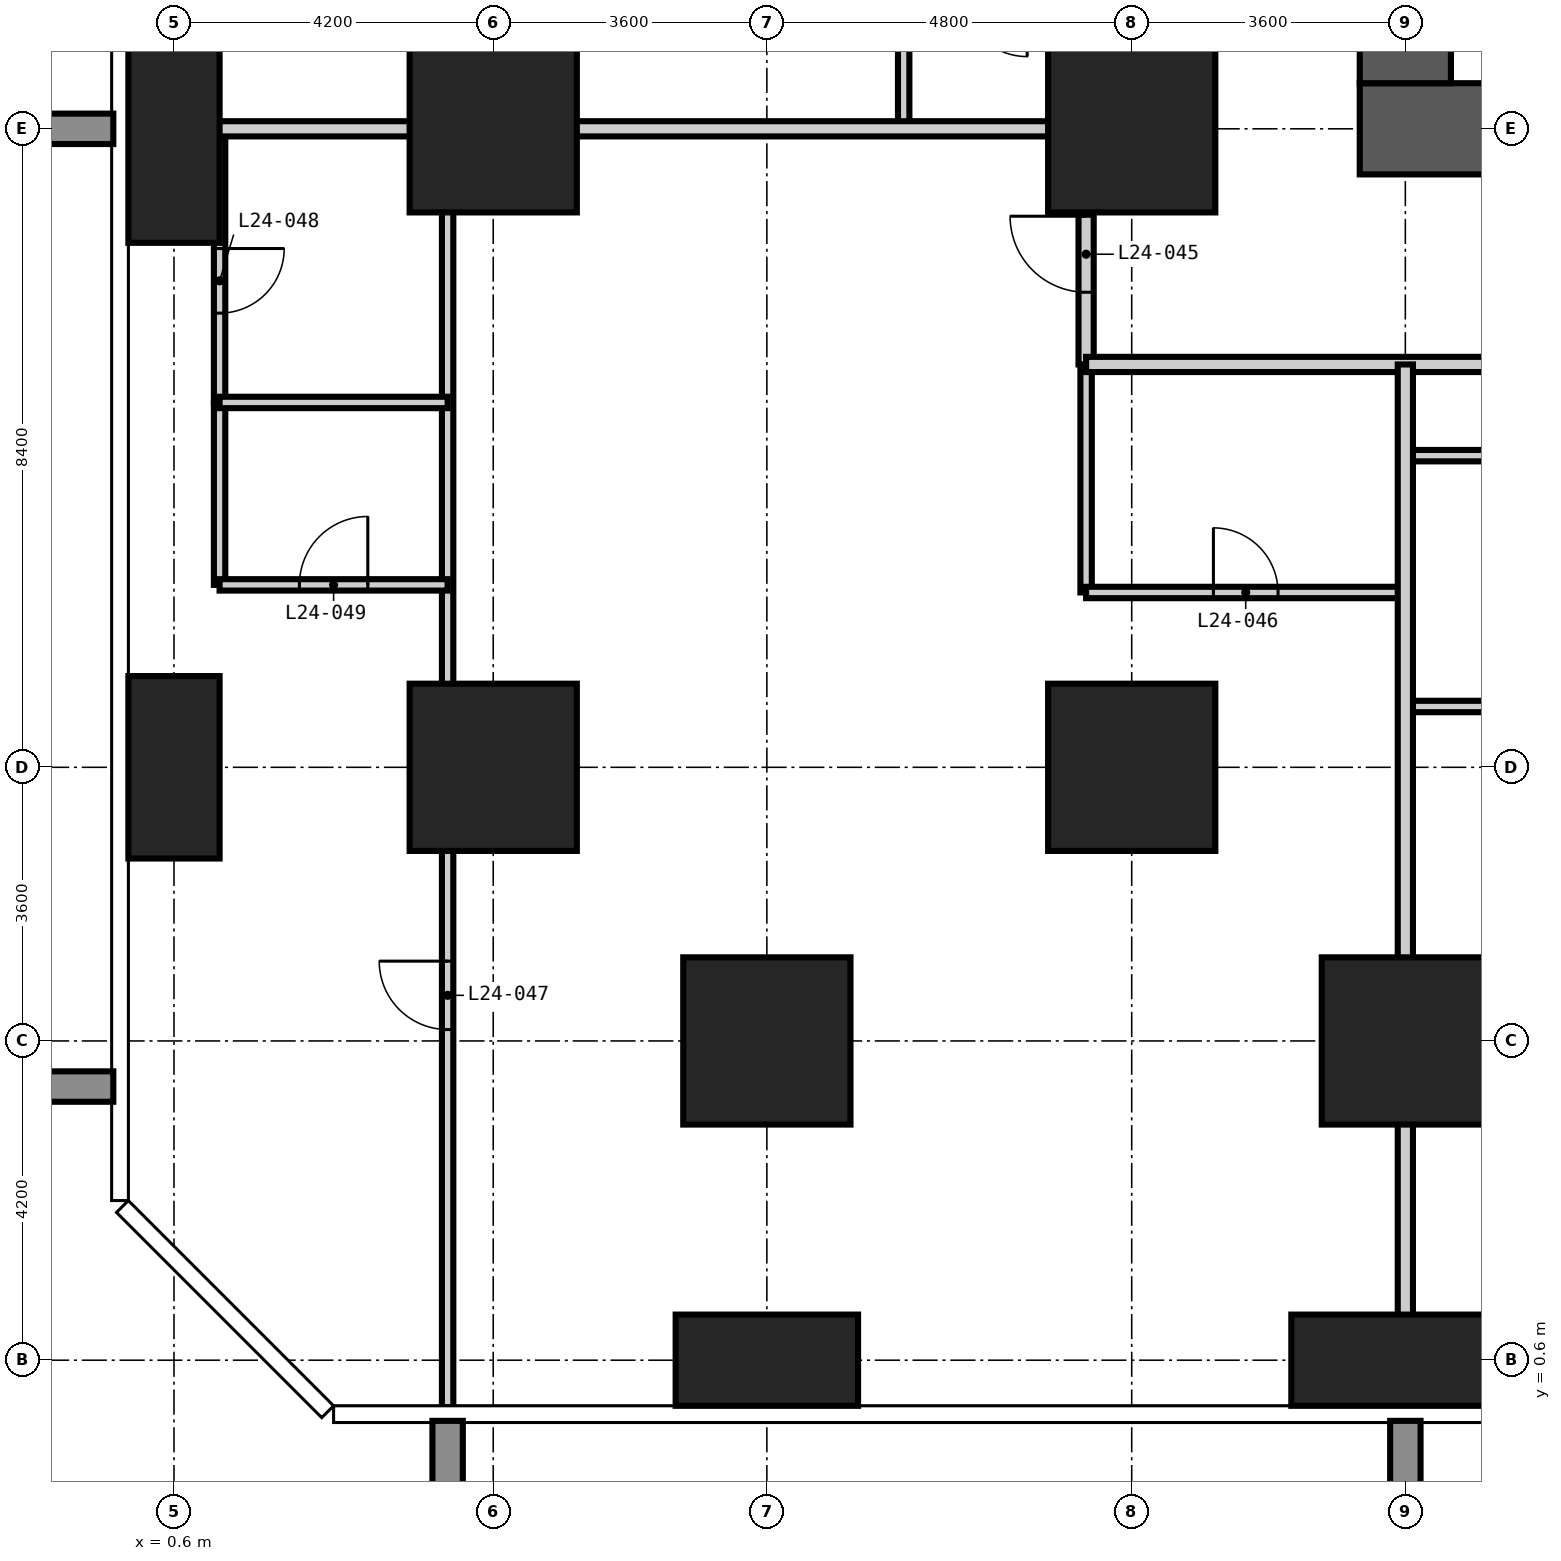
"""IFC4 building model, lengths in metres.
Left out: names, types, materials, properties, quantities, classifications, styles, units other than length and angle.
Written with IfcOpenShell. Run it as: python <this file> out.ifc"""

import sys

from ifc_helpers import new_model, si_unit, direction, frame, frame_2d, origin, origin_2d, place, context, subcontext, project, spatial, rectangle, extrude, element, fill, save


model = new_model("IFC4")
c1 = context("Model", 3, precision=1e-05, world=origin(), true_north=direction((0.0, 1.0)))
c2 = subcontext(c1, "Body", "Model", "MODEL_VIEW")
j1 = project(units=[si_unit("LENGTHUNIT", "METRE"), si_unit("PLANEANGLEUNIT", "RADIAN")], contexts=[c1])
p1 = place(None, origin())
s1 = spatial("IfcSite", under=j1, at=p1, CompositionType="ELEMENT")
p2 = place(p1, origin())
s2 = spatial("IfcBuilding", under=s1, at=p2, CompositionType="ELEMENT")
p3 = place(p2, frame((0.0, 0.0, 97.2)))
s3 = spatial("IfcBuildingStorey", under=s2, at=p3, CompositionType="ELEMENT", Elevation=97.2)
p4 = place(p3, frame((0.6, 8.4, -0.35), z_axis=(0.0, 0.0, 1.0), x_axis=(1.0, 0.0, 0.0)))
e1 = element("IfcColumn", 1, at=p4, inside=s3, PredefinedType="COLUMN", context=c2, shape_type="SweptSolid", body=[
    extrude(rectangle(XDim=1.2, YDim=2.4, at=origin_2d()), origin(), (0.0, 0.0, 1.0), 3.6),
])
p5 = place(p3, frame((0.6, 16.8, -0.35), z_axis=(0.0, 0.0, 1.0), x_axis=(1.0, 0.0, 0.0)))
e2 = element("IfcColumn", 2, at=p5, inside=s3, PredefinedType="COLUMN", context=c2, shape_type="SweptSolid", body=[
    extrude(rectangle(XDim=1.2, YDim=3.0, at=origin_2d()), origin(), (0.0, 0.0, 1.0), 3.6),
])
for number, where, z_axis, x_axis in (
    (3, (4.8, 8.4, -0.35), (0.0, 0.0, 1.0), (1.0, 0.0, 0.0)),
    (4, (4.8, 16.8, -0.35), (0.0, 0.0, 1.0), (1.0, 0.0, 0.0)),
):
    element("IfcColumn", number, at=place(p3, frame(where, z_axis=z_axis, x_axis=x_axis)), inside=s3, PredefinedType="COLUMN", context=c2, shape_type="SweptSolid", body=[
        extrude(rectangle(XDim=2.2, YDim=2.2, at=origin_2d()), origin(), (0.0, 0.0, 1.0), 3.6),
    ])
p6 = place(p3, frame((8.4, 0.6, -0.35), z_axis=(0.0, 0.0, 1.0), x_axis=(1.0, 0.0, 0.0)))
e5 = element("IfcColumn", 5, at=p6, inside=s3, PredefinedType="COLUMN", context=c2, shape_type="SweptSolid", body=[
    extrude(rectangle(XDim=2.4, YDim=1.2, at=origin_2d()), origin(), (0.0, 0.0, 1.0), 3.6),
])
for number, where, z_axis, x_axis in (
    (6, (8.4, 4.8, -0.35), (0.0, 0.0, 1.0), (1.0, 0.0, 0.0)),
    (7, (13.2, 8.4, -0.35), (0.0, 0.0, 1.0), (1.0, 0.0, 0.0)),
    (8, (13.2, 16.8, -0.35), (0.0, 0.0, 1.0), (1.0, 0.0, 0.0)),
):
    element("IfcColumn", number, at=place(p3, frame(where, z_axis=z_axis, x_axis=x_axis)), inside=s3, PredefinedType="COLUMN", context=c2, shape_type="SweptSolid", body=[
        extrude(rectangle(XDim=2.2, YDim=2.2, at=origin_2d()), origin(), (0.0, 0.0, 1.0), 3.6),
    ])
p7 = place(p3, frame((16.8, 0.6, -0.35), z_axis=(0.0, 0.0, 1.0), x_axis=(1.0, 0.0, 0.0)))
e9 = element("IfcColumn", 9, at=p7, inside=s3, PredefinedType="COLUMN", context=c2, shape_type="SweptSolid", body=[
    extrude(rectangle(XDim=3.0, YDim=1.2, at=origin_2d()), origin(), (0.0, 0.0, 1.0), 3.6),
])
p8 = place(p3, frame((16.8, 4.8, -0.35), z_axis=(0.0, 0.0, 1.0), x_axis=(1.0, 0.0, 0.0)))
e10 = element("IfcColumn", 10, at=p8, inside=s3, PredefinedType="COLUMN", context=c2, shape_type="SweptSolid", body=[
    extrude(rectangle(XDim=2.2, YDim=2.2, at=origin_2d()), origin(), (0.0, 0.0, 1.0), 3.6),
])
p9 = place(p3, frame((16.2, 16.8, -0.35), z_axis=(0.0, 0.0, 1.0), x_axis=(1.0, 0.0, 0.0)))
e11 = element("IfcWall", 11, at=p9, inside=s3, PredefinedType="SHEAR", context=c2, shape_type="SweptSolid", body=[
    extrude(rectangle(XDim=26.4, YDim=1.2, at=frame_2d((13.2, 0.0))), origin(), (0.0, 0.0, 1.0), 3.6),
])
p10 = place(p9, frame((12.7, 0.0, 0.35)))
e12 = element("IfcOpeningElement", 12, at=p10, cuts=e11, PredefinedType="OPENING", context=c2, shape_type="SweptSolid", body=[
    extrude(rectangle(XDim=1.0, YDim=2.1, at=frame_2d((0.5, 1.05))), frame((0.0, 0.61, 0.0), z_axis=(0.0, -1.0, 0.0), x_axis=(1.0, 0.0, 0.0)), (0.0, 0.0, 1.0), 1.22),
])
p11 = place(p9, frame((19.0, 0.0, 0.35)))
e13 = element("IfcOpeningElement", 13, at=p11, cuts=e11, PredefinedType="OPENING", context=c2, shape_type="SweptSolid", body=[
    extrude(rectangle(XDim=1.0, YDim=2.1, at=frame_2d((0.5, 1.05))), frame((0.0, 0.61, 0.0), z_axis=(0.0, -1.0, 0.0), x_axis=(1.0, 0.0, 0.0)), (0.0, 0.0, 1.0), 1.22),
])
p12 = place(p3, frame((16.8, 41.4, -0.35), z_axis=(0.0, 0.0, 1.0), x_axis=(0.0, -1.0, 0.0)))
e14 = element("IfcWall", 14, at=p12, inside=s3, PredefinedType="SHEAR", context=c2, shape_type="SweptSolid", body=[
    extrude(rectangle(XDim=24.0, YDim=1.2, at=frame_2d((12.0, 0.0))), origin(), (0.0, 0.0, 1.0), 3.6),
])
p13 = place(p12, frame((11.1, 0.0, 0.35)))
e15 = element("IfcOpeningElement", 15, at=p13, cuts=e14, PredefinedType="OPENING", context=c2, shape_type="SweptSolid", body=[
    extrude(rectangle(XDim=1.8, YDim=2.2, at=frame_2d((0.9, 1.1))), frame((0.0, 0.61, 0.0), z_axis=(0.0, -1.0, 0.0), x_axis=(1.0, 0.0, 0.0)), (0.0, 0.0, 1.0), 1.22),
])
p14 = place(p12, frame((19.9, 0.0, 0.35)))
e16 = element("IfcOpeningElement", 16, at=p14, cuts=e14, PredefinedType="OPENING", context=c2, shape_type="SweptSolid", body=[
    extrude(rectangle(XDim=1.0, YDim=2.1, at=frame_2d((0.5, 1.05))), frame((0.0, 0.61, 0.0), z_axis=(0.0, -1.0, 0.0), x_axis=(1.0, 0.0, 0.0)), (0.0, 0.0, 1.0), 1.22),
])
p15 = place(p12, frame((5.2, 0.0, 0.35)))
e17 = element("IfcOpeningElement", 17, at=p15, cuts=e14, PredefinedType="OPENING", context=c2, shape_type="SweptSolid", body=[
    extrude(rectangle(XDim=1.0, YDim=2.1, at=frame_2d((0.5, 1.05))), frame((0.0, 0.61, 0.0), z_axis=(0.0, -1.0, 0.0), x_axis=(1.0, 0.0, 0.0)), (0.0, 0.0, 1.0), 1.22),
])
p16 = place(p3, frame((1.2, 13.2, 0.0), z_axis=(0.0, 0.0, 1.0), x_axis=(0.0, 1.0, 0.0)))
e18 = element("IfcWall", 18, at=p16, inside=s3, PredefinedType="PARTITIONING", context=c2, shape_type="SweptSolid", body=[
    extrude(rectangle(XDim=3.6, YDim=0.15, at=frame_2d((1.8, 0.0))), origin(), (0.0, 0.0, 1.0), 3.25),
])
p17 = place(p16, frame((1.175, 0.0, 0.0)))
e19 = element("IfcOpeningElement", 19, at=p17, cuts=e18, PredefinedType="OPENING", context=c2, shape_type="SweptSolid", body=[
    extrude(rectangle(XDim=0.85, YDim=2.1, at=frame_2d((0.425, 1.05))), frame((0.0, 0.085, 0.0), z_axis=(0.0, -1.0, 0.0), x_axis=(1.0, 0.0, 0.0)), (0.0, 0.0, 1.0), 0.17),
])
p18 = place(p3, frame((10.2, 16.8, 0.0), z_axis=(0.0, 0.0, 1.0), x_axis=(0.0, 1.0, 0.0)))
e20 = element("IfcWall", 20, at=p18, inside=s3, PredefinedType="PARTITIONING", context=c2, shape_type="SweptSolid", body=[
    extrude(rectangle(XDim=1.8, YDim=0.15, at=frame_2d((0.9, 0.0))), origin(), (0.0, 0.0, 1.0), 3.25),
])
p19 = place(p3, frame((12.6, 10.7, 0.0), z_axis=(0.0, 0.0, 1.0), x_axis=(0.0, 1.0, 0.0)))
e21 = element("IfcWall", 21, at=p19, inside=s3, PredefinedType="PARTITIONING", context=c2, shape_type="SweptSolid", body=[
    extrude(rectangle(XDim=3.0, YDim=0.15, at=frame_2d((1.5, 0.0))), origin(), (0.0, 0.0, 1.0), 3.25),
])
p20 = place(p3, frame((16.8, 9.2, 0.0), z_axis=(0.0, 0.0, 1.0), x_axis=(1.0, 0.0, 0.0)))
e22 = element("IfcWall", 22, at=p20, inside=s3, PredefinedType="PARTITIONING", context=c2, shape_type="SweptSolid", body=[
    extrude(rectangle(XDim=2.4, YDim=0.15, at=frame_2d((1.2, 0.0))), origin(), (0.0, 0.0, 1.0), 3.25),
])
p21 = place(p3, frame((12.6, 10.7, 0.0), z_axis=(0.0, 0.0, 1.0), x_axis=(1.0, 0.0, 0.0)))
e23 = element("IfcWall", 23, at=p21, inside=s3, PredefinedType="PARTITIONING", context=c2, shape_type="SweptSolid", body=[
    extrude(rectangle(XDim=4.2, YDim=0.15, at=frame_2d((2.1, 0.0))), origin(), (0.0, 0.0, 1.0), 3.25),
])
p22 = place(p21, frame((1.675, 0.0, 0.0)))
e24 = element("IfcOpeningElement", 24, at=p22, cuts=e23, PredefinedType="OPENING", context=c2, shape_type="SweptSolid", body=[
    extrude(rectangle(XDim=0.85, YDim=2.1, at=frame_2d((0.425, 1.05))), frame((0.0, 0.085, 0.0), z_axis=(0.0, -1.0, 0.0), x_axis=(1.0, 0.0, 0.0)), (0.0, 0.0, 1.0), 0.17),
])
p23 = place(p3, frame((16.8, 12.5, 0.0), z_axis=(0.0, 0.0, 1.0), x_axis=(1.0, 0.0, 0.0)))
e25 = element("IfcWall", 25, at=p23, inside=s3, PredefinedType="PARTITIONING", context=c2, shape_type="SweptSolid", body=[
    extrude(rectangle(XDim=2.4, YDim=0.15, at=frame_2d((1.2, 0.0))), origin(), (0.0, 0.0, 1.0), 3.25),
])
p24 = place(p3, frame((12.6, 13.7, 0.0), z_axis=(0.0, 0.0, 1.0), x_axis=(0.0, 1.0, 0.0)))
e26 = element("IfcWall", 26, at=p24, inside=s3, PredefinedType="PARTITIONING", context=c2, shape_type="SweptSolid", body=[
    extrude(rectangle(XDim=32.0, YDim=0.2, at=frame_2d((16.0, 0.0))), origin(), (0.0, 0.0, 1.0), 3.25),
])
p25 = place(p24, frame((5.6, 0.0, 0.0)))
e27 = element("IfcOpeningElement", 27, at=p25, cuts=e26, PredefinedType="OPENING", context=c2, shape_type="SweptSolid", body=[
    extrude(rectangle(XDim=1.0, YDim=2.2, at=frame_2d((0.5, 1.1))), frame((0.0, 0.11, 0.0), z_axis=(0.0, -1.0, 0.0), x_axis=(1.0, 0.0, 0.0)), (0.0, 0.0, 1.0), 0.22),
])
p26 = place(p24, frame((16.4, 0.0, 0.0)))
e28 = element("IfcOpeningElement", 28, at=p26, cuts=e26, PredefinedType="OPENING", context=c2, shape_type="SweptSolid", body=[
    extrude(rectangle(XDim=1.0, YDim=2.2, at=frame_2d((0.5, 1.1))), frame((0.0, 0.11, 0.0), z_axis=(0.0, -1.0, 0.0), x_axis=(1.0, 0.0, 0.0)), (0.0, 0.0, 1.0), 0.22),
])
p27 = place(p24, frame((22.4, 0.0, 0.0)))
e29 = element("IfcOpeningElement", 29, at=p27, cuts=e26, PredefinedType="OPENING", context=c2, shape_type="SweptSolid", body=[
    extrude(rectangle(XDim=1.0, YDim=2.2, at=frame_2d((0.5, 1.1))), frame((0.0, 0.11, 0.0), z_axis=(0.0, -1.0, 0.0), x_axis=(1.0, 0.0, 0.0)), (0.0, 0.0, 1.0), 0.22),
])
p28 = place(p24, frame((0.95, 0.0, 0.0)))
e30 = element("IfcOpeningElement", 30, at=p28, cuts=e26, PredefinedType="OPENING", context=c2, shape_type="SweptSolid", body=[
    extrude(rectangle(XDim=1.0, YDim=2.2, at=frame_2d((0.5, 1.1))), frame((0.0, 0.11, 0.0), z_axis=(0.0, -1.0, 0.0), x_axis=(1.0, 0.0, 0.0)), (0.0, 0.0, 1.0), 0.22),
])
p29 = place(p24, frame((29.65, 0.0, 0.0)))
e31 = element("IfcOpeningElement", 31, at=p29, cuts=e26, PredefinedType="OPENING", context=c2, shape_type="SweptSolid", body=[
    extrude(rectangle(XDim=1.0, YDim=2.2, at=frame_2d((0.5, 1.1))), frame((0.0, 0.11, 0.0), z_axis=(0.0, -1.0, 0.0), x_axis=(1.0, 0.0, 0.0)), (0.0, 0.0, 1.0), 0.22),
])
p30 = place(p3, frame((44.5, 13.7, 0.0), z_axis=(0.0, 0.0, 1.0), x_axis=(-1.0, 0.0, 0.0)))
e32 = element("IfcWall", 32, at=p30, inside=s3, PredefinedType="PARTITIONING", context=c2, shape_type="SweptSolid", body=[
    extrude(rectangle(XDim=31.9, YDim=0.2, at=frame_2d((15.95, 0.0))), origin(), (0.0, 0.0, 1.0), 3.25),
])
p31 = place(p30, frame((23.0, 0.0, 0.0)))
e33 = element("IfcOpeningElement", 33, at=p31, cuts=e32, PredefinedType="OPENING", context=c2, shape_type="SweptSolid", body=[
    extrude(rectangle(XDim=1.0, YDim=2.2, at=frame_2d((0.5, 1.1))), frame((0.0, 0.11, 0.0), z_axis=(0.0, -1.0, 0.0), x_axis=(1.0, 0.0, 0.0)), (0.0, 0.0, 1.0), 0.22),
])
p32 = place(p30, frame((14.6, 0.0, 0.0)))
e34 = element("IfcOpeningElement", 34, at=p32, cuts=e32, PredefinedType="OPENING", context=c2, shape_type="SweptSolid", body=[
    extrude(rectangle(XDim=1.0, YDim=2.2, at=frame_2d((0.5, 1.1))), frame((0.0, 0.11, 0.0), z_axis=(0.0, -1.0, 0.0), x_axis=(1.0, 0.0, 0.0)), (0.0, 0.0, 1.0), 0.22),
])
p33 = place(p30, frame((6.2, 0.0, 0.0)))
e35 = element("IfcOpeningElement", 35, at=p33, cuts=e32, PredefinedType="OPENING", context=c2, shape_type="SweptSolid", body=[
    extrude(rectangle(XDim=1.0, YDim=2.2, at=frame_2d((0.5, 1.1))), frame((0.0, 0.11, 0.0), z_axis=(0.0, -1.0, 0.0), x_axis=(1.0, 0.0, 0.0)), (0.0, 0.0, 1.0), 0.22),
])
p34 = place(p3, frame((16.8, -0.018, 0.0), z_axis=(0.0, 0.0, 1.0), x_axis=(0.0, 1.0, 0.0)))
e36 = element("IfcWall", 36, at=p34, inside=s3, PredefinedType="PARTITIONING", context=c2, shape_type="SweptSolid", body=[
    extrude(rectangle(XDim=13.718, YDim=0.2, at=frame_2d((6.859, 0.0))), origin(), (0.0, 0.0, 1.0), 3.25),
])
p35 = place(p3, frame((-0.018, 16.8, 0.0), z_axis=(0.0, 0.0, 1.0), x_axis=(1.0, 0.0, 0.0)))
e37 = element("IfcWall", 37, at=p35, inside=s3, PredefinedType="PARTITIONING", context=c2, shape_type="SweptSolid", body=[
    extrude(rectangle(XDim=12.618, YDim=0.2, at=frame_2d((6.309, 0.0))), origin(), (0.0, 0.0, 1.0), 3.25),
])
p36 = place(p3, frame((1.2, 10.8, 0.0), z_axis=(0.0, 0.0, 1.0), x_axis=(0.0, 1.0, 0.0)))
e38 = element("IfcWall", 38, at=p36, inside=s3, PredefinedType="PARTITIONING", context=c2, shape_type="SweptSolid", body=[
    extrude(rectangle(XDim=2.4, YDim=0.15, at=frame_2d((1.2, 0.0))), origin(), (0.0, 0.0, 1.0), 3.25),
])
p37 = place(p3, frame((4.2, -0.018, 0.0), z_axis=(0.0, 0.0, 1.0), x_axis=(0.0, 1.0, 0.0)))
e39 = element("IfcWall", 39, at=p37, inside=s3, PredefinedType="PARTITIONING", context=c2, shape_type="SweptSolid", body=[
    extrude(rectangle(XDim=16.818, YDim=0.15, at=frame_2d((8.409, 0.0))), origin(), (0.0, 0.0, 1.0), 3.25),
])
p38 = place(p37, frame((4.968, 0.0, 0.0)))
e40 = element("IfcOpeningElement", 40, at=p38, cuts=e39, PredefinedType="OPENING", context=c2, shape_type="SweptSolid", body=[
    extrude(rectangle(XDim=0.9, YDim=2.1, at=frame_2d((0.45, 1.05))), frame((0.0, 0.085, 0.0), z_axis=(0.0, -1.0, 0.0), x_axis=(1.0, 0.0, 0.0)), (0.0, 0.0, 1.0), 0.17),
])
p39 = place(p3, frame((1.2, 10.8, 0.0), z_axis=(0.0, 0.0, 1.0), x_axis=(1.0, 0.0, 0.0)))
e41 = element("IfcWall", 41, at=p39, inside=s3, PredefinedType="PARTITIONING", context=c2, shape_type="SweptSolid", body=[
    extrude(rectangle(XDim=3.0, YDim=0.15, at=frame_2d((1.5, 0.0))), origin(), (0.0, 0.0, 1.0), 3.25),
])
p40 = place(p39, frame((1.05, 0.0, 0.0)))
e42 = element("IfcOpeningElement", 42, at=p40, cuts=e41, PredefinedType="OPENING", context=c2, shape_type="SweptSolid", body=[
    extrude(rectangle(XDim=0.9, YDim=2.1, at=frame_2d((0.45, 1.05))), frame((0.0, 0.085, 0.0), z_axis=(0.0, -1.0, 0.0), x_axis=(1.0, 0.0, 0.0)), (0.0, 0.0, 1.0), 0.17),
])
p41 = place(p3, frame((1.2, 13.2, 0.0), z_axis=(0.0, 0.0, 1.0), x_axis=(1.0, 0.0, 0.0)))
e43 = element("IfcWall", 43, at=p41, inside=s3, PredefinedType="PARTITIONING", context=c2, shape_type="SweptSolid", body=[
    extrude(rectangle(XDim=3.0, YDim=0.15, at=frame_2d((1.5, 0.0))), origin(), (0.0, 0.0, 1.0), 3.25),
])
p42 = place(p28, origin())
e44 = element("IfcDoor", 44, at=p42, inside=s3, OperationType="SINGLE_SWING_RIGHT", PredefinedType="DOOR", context=c2, shape_type="SweptSolid", body=[
    extrude(rectangle(XDim=1.0, YDim=2.2, at=frame_2d((0.5, 1.1))), frame((0.0, 0.025, 0.0), z_axis=(0.0, -1.0, 0.0), x_axis=(1.0, 0.0, 0.0)), (0.0, 0.0, 1.0), 0.05),
])
fill(e30, e44)
p43 = place(p22, origin())
e45 = element("IfcDoor", 45, at=p43, inside=s3, OperationType="SINGLE_SWING_LEFT", PredefinedType="DOOR", context=c2, shape_type="SweptSolid", body=[
    extrude(rectangle(XDim=0.85, YDim=2.1, at=frame_2d((0.425, 1.05))), frame((0.0, 0.025, 0.0), z_axis=(0.0, -1.0, 0.0), x_axis=(1.0, 0.0, 0.0)), (0.0, 0.0, 1.0), 0.05),
])
fill(e24, e45)
p44 = place(p38, origin())
e46 = element("IfcDoor", 46, at=p44, inside=s3, OperationType="SINGLE_SWING_RIGHT", PredefinedType="DOOR", context=c2, shape_type="SweptSolid", body=[
    extrude(rectangle(XDim=0.9, YDim=2.1, at=frame_2d((0.45, 1.05))), frame((0.0, 0.025, 0.0), z_axis=(0.0, -1.0, 0.0), x_axis=(1.0, 0.0, 0.0)), (0.0, 0.0, 1.0), 0.05),
])
fill(e40, e46)
p45 = place(p17, frame((0.85, 0.0, 0.0), z_axis=(0.0, 0.0, 1.0), x_axis=(-1.0, 0.0, 0.0)))
e47 = element("IfcDoor", 47, at=p45, inside=s3, OperationType="SINGLE_SWING_LEFT", PredefinedType="DOOR", context=c2, shape_type="SweptSolid", body=[
    extrude(rectangle(XDim=0.85, YDim=2.1, at=frame_2d((0.425, 1.05))), frame((0.0, 0.025, 0.0), z_axis=(0.0, -1.0, 0.0), x_axis=(1.0, 0.0, 0.0)), (0.0, 0.0, 1.0), 0.05),
])
fill(e19, e47)
p46 = place(p40, origin())
e48 = element("IfcDoor", 48, at=p46, inside=s3, OperationType="SINGLE_SWING_RIGHT", PredefinedType="DOOR", context=c2, shape_type="SweptSolid", body=[
    extrude(rectangle(XDim=0.9, YDim=2.1, at=frame_2d((0.45, 1.05))), frame((0.0, 0.025, 0.0), z_axis=(0.0, -1.0, 0.0), x_axis=(1.0, 0.0, 0.0)), (0.0, 0.0, 1.0), 0.05),
])
fill(e42, e48)
save(model, sys.argv[1])
